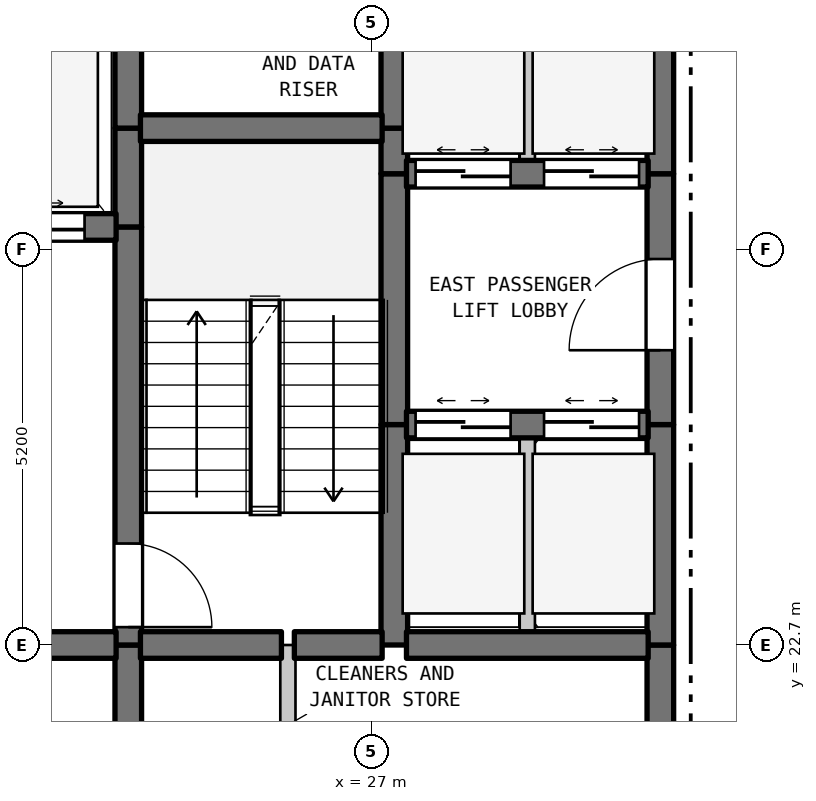
"""IFC4 building model, lengths in metres.
Left out: names, types, materials, properties, quantities, classifications, styles, units other than length and angle.
Written with IfcOpenShell. Run it as: python <this file> out.ifc"""

import sys

from ifc_helpers import new_model, si_unit, direction, frame, frame_2d, origin, place, context, subcontext, project, spatial, rectangle, extrude, element, fill, save


model = new_model("IFC4")
c1 = context("Model", 3, precision=1e-05, world=origin(), true_north=direction((0.0, 1.0)))
c2 = subcontext(c1, "Body", "Model", "MODEL_VIEW")
j1 = project(units=[si_unit("LENGTHUNIT", "METRE"), si_unit("PLANEANGLEUNIT", "RADIAN")], contexts=[c1])
p1 = place(None, origin())
s1 = spatial("IfcSite", under=j1, at=p1, CompositionType="ELEMENT")
p2 = place(p1, origin())
s2 = spatial("IfcBuilding", under=s1, at=p2, CompositionType="ELEMENT")
p3 = place(p2, frame((0.0, 0.0, 152.0)))
s3 = spatial("IfcBuildingStorey", under=s2, at=p3, CompositionType="ELEMENT", Elevation=152.0)
p4 = place(p3, frame((23.8, 19.5, 0.0), z_axis=(0.0, 0.0, 1.0), x_axis=(0.0, 1.0, 0.0)))
e1 = element("IfcWall", 1, at=p4, inside=s3, PredefinedType="SHEAR", context=c2, shape_type="SweptSolid", body=[
    extrude(rectangle(XDim=3.2, YDim=0.35, at=frame_2d((1.6, 0.0))), origin(), (0.0, 0.0, 1.0), 3.385),
])
p5 = place(p3, frame((23.8, 22.7, 0.0), z_axis=(0.0, 0.0, 1.0), x_axis=(0.0, 1.0, 0.0)))
e2 = element("IfcWall", 2, at=p5, inside=s3, PredefinedType="SHEAR", context=c2, shape_type="SweptSolid", body=[
    extrude(rectangle(XDim=5.5, YDim=0.35, at=frame_2d((2.75, 0.0))), origin(), (0.0, 0.0, 1.0), 3.385),
])
p6 = place(p5, frame((0.235, 0.0, 0.0)))
e3 = element("IfcOpeningElement", 3, at=p6, cuts=e2, PredefinedType="OPENING", context=c2, shape_type="SweptSolid", body=[
    extrude(rectangle(XDim=1.1, YDim=2.15, at=frame_2d((0.55, 1.075))), frame((0.0, 0.185, 0.0), z_axis=(0.0, -1.0, 0.0), x_axis=(1.0, 0.0, 0.0)), (0.0, 0.0, 1.0), 0.37),
])
for number, where, z_axis, x_axis in (
    (4, (23.8, 28.2, 0.0), (0.0, 0.0, 1.0), (0.0, 1.0, 0.0)),
    (5, (23.8, 29.5, 0.0), (0.0, 0.0, 1.0), (0.0, 1.0, 0.0)),
):
    element("IfcWall", number, at=place(p3, frame(where, z_axis=z_axis, x_axis=x_axis)), inside=s3, PredefinedType="SHEAR", context=c2, shape_type="SweptSolid", body=[
        extrude(rectangle(XDim=1.3, YDim=0.35, at=frame_2d((0.65, 0.0))), origin(), (0.0, 0.0, 1.0), 3.385),
    ])
p7 = place(p3, frame((25.9, 19.5, 0.0), z_axis=(0.0, 0.0, 1.0), x_axis=(0.0, 1.0, 0.0)))
e6 = element("IfcWall", 6, at=p7, inside=s3, PredefinedType="STANDARD", context=c2, shape_type="SweptSolid", body=[
    extrude(rectangle(XDim=3.2, YDim=0.2, at=frame_2d((1.6, 0.0))), origin(), (0.0, 0.0, 1.0), 3.385),
])
p8 = place(p3, frame((27.3, 22.7, 0.0), z_axis=(0.0, 0.0, 1.0), x_axis=(0.0, 1.0, 0.0)))
e7 = element("IfcWall", 7, at=p8, inside=s3, PredefinedType="SHEAR", context=c2, shape_type="SweptSolid", body=[
    extrude(rectangle(XDim=2.9, YDim=0.35, at=frame_2d((1.45, 0.0))), origin(), (0.0, 0.0, 1.0), 3.385),
])
p9 = place(p3, frame((27.3, 25.6, 0.0), z_axis=(0.0, 0.0, 1.0), x_axis=(0.0, 1.0, 0.0)))
e8 = element("IfcWall", 8, at=p9, inside=s3, PredefinedType="SHEAR", context=c2, shape_type="SweptSolid", body=[
    extrude(rectangle(XDim=3.3, YDim=0.35, at=frame_2d((1.65, 0.0))), origin(), (0.0, 0.0, 1.0), 3.385),
])
p10 = place(p3, frame((27.3, 28.9, 0.0), z_axis=(0.0, 0.0, 1.0), x_axis=(0.0, 1.0, 0.0)))
e9 = element("IfcWall", 9, at=p10, inside=s3, PredefinedType="SHEAR", context=c2, shape_type="SweptSolid", body=[
    extrude(rectangle(XDim=0.6, YDim=0.35, at=frame_2d((0.3, 0.0))), origin(), (0.0, 0.0, 1.0), 3.385),
])
p11 = place(p3, frame((27.3, 29.5, 0.0), z_axis=(0.0, 0.0, 1.0), x_axis=(0.0, 1.0, 0.0)))
e10 = element("IfcWall", 10, at=p11, inside=s3, PredefinedType="SHEAR", context=c2, shape_type="SweptSolid", body=[
    extrude(rectangle(XDim=2.0, YDim=0.35, at=frame_2d((1.0, 0.0))), origin(), (0.0, 0.0, 1.0), 3.385),
])
p12 = place(p3, frame((29.05, 22.7, 0.0), z_axis=(0.0, 0.0, 1.0), x_axis=(0.0, 1.0, 0.0)))
e11 = element("IfcWall", 11, at=p12, inside=s3, PredefinedType="STANDARD", context=c2, shape_type="SweptSolid", body=[
    extrude(rectangle(XDim=2.9, YDim=0.2, at=frame_2d((1.45, 0.0))), origin(), (0.0, 0.0, 1.0), 3.385),
])
p13 = place(p3, frame((29.05, 28.9, 0.0), z_axis=(0.0, 0.0, 1.0), x_axis=(0.0, 1.0, 0.0)))
e12 = element("IfcWall", 12, at=p13, inside=s3, PredefinedType="STANDARD", context=c2, shape_type="SweptSolid", body=[
    extrude(rectangle(XDim=2.6, YDim=0.2, at=frame_2d((1.3, 0.0))), origin(), (0.0, 0.0, 1.0), 3.385),
])
p14 = place(p3, frame((30.8, 19.5, 0.0), z_axis=(0.0, 0.0, 1.0), x_axis=(0.0, 1.0, 0.0)))
e13 = element("IfcWall", 13, at=p14, inside=s3, PredefinedType="SHEAR", context=c2, shape_type="SweptSolid", body=[
    extrude(rectangle(XDim=3.2, YDim=0.35, at=frame_2d((1.6, 0.0))), origin(), (0.0, 0.0, 1.0), 3.385),
])
p15 = place(p3, frame((30.8, 22.7, 0.0), z_axis=(0.0, 0.0, 1.0), x_axis=(0.0, 1.0, 0.0)))
e14 = element("IfcWall", 14, at=p15, inside=s3, PredefinedType="SHEAR", context=c2, shape_type="SweptSolid", body=[
    extrude(rectangle(XDim=2.9, YDim=0.35, at=frame_2d((1.45, 0.0))), origin(), (0.0, 0.0, 1.0), 3.385),
])
p16 = place(p3, frame((30.8, 25.6, 0.0), z_axis=(0.0, 0.0, 1.0), x_axis=(0.0, 1.0, 0.0)))
e15 = element("IfcWall", 15, at=p16, inside=s3, PredefinedType="SHEAR", context=c2, shape_type="SweptSolid", body=[
    extrude(rectangle(XDim=3.3, YDim=0.35, at=frame_2d((1.65, 0.0))), origin(), (0.0, 0.0, 1.0), 3.385),
])
p17 = place(p16, frame((0.978, 0.0, 0.0)))
e16 = element("IfcOpeningElement", 16, at=p17, cuts=e15, PredefinedType="OPENING", context=c2, shape_type="SweptSolid", body=[
    extrude(rectangle(XDim=1.2, YDim=2.2, at=frame_2d((0.6, 1.1))), frame((0.0, 0.185, 0.0), z_axis=(0.0, -1.0, 0.0), x_axis=(1.0, 0.0, 0.0)), (0.0, 0.0, 1.0), 0.37),
])
p18 = place(p3, frame((30.8, 28.9, 0.0), z_axis=(0.0, 0.0, 1.0), x_axis=(0.0, 1.0, 0.0)))
e17 = element("IfcWall", 17, at=p18, inside=s3, PredefinedType="SHEAR", context=c2, shape_type="SweptSolid", body=[
    extrude(rectangle(XDim=2.6, YDim=0.35, at=frame_2d((1.3, 0.0))), origin(), (0.0, 0.0, 1.0), 3.385),
])
p19 = place(p3, frame((19.16, 22.7, 0.0), z_axis=(0.0, 0.0, 1.0), x_axis=(1.0, 0.0, 0.0)))
e18 = element("IfcWall", 18, at=p19, inside=s3, PredefinedType="SHEAR", context=c2, shape_type="SweptSolid", body=[
    extrude(rectangle(XDim=4.48, YDim=0.35, at=frame_2d((2.24, 0.0))), origin(), (0.0, 0.0, 1.0), 3.385),
])
p20 = place(p19, frame((1.64, 0.0, 0.0)))
e19 = element("IfcOpeningElement", 19, at=p20, cuts=e18, PredefinedType="OPENING", context=c2, shape_type="SweptSolid", body=[
    extrude(rectangle(XDim=1.2, YDim=2.2, at=frame_2d((0.6, 1.1))), frame((0.0, 0.185, 0.0), z_axis=(0.0, -1.0, 0.0), x_axis=(1.0, 0.0, 0.0)), (0.0, 0.0, 1.0), 0.37),
])
p21 = place(p3, frame((23.96, 22.7, 0.0), z_axis=(0.0, 0.0, 1.0), x_axis=(1.0, 0.0, 0.0)))
e20 = element("IfcWall", 20, at=p21, inside=s3, PredefinedType="SHEAR", context=c2, shape_type="SweptSolid", body=[
    extrude(rectangle(XDim=1.855, YDim=0.35, at=frame_2d((0.927, 0.0))), origin(), (0.0, 0.0, 1.0), 3.385),
])
p22 = place(p3, frame((25.985, 22.7, 0.0), z_axis=(0.0, 0.0, 1.0), x_axis=(1.0, 0.0, 0.0)))
e21 = element("IfcWall", 21, at=p22, inside=s3, PredefinedType="SHEAR", context=c2, shape_type="SweptSolid", body=[
    extrude(rectangle(XDim=1.155, YDim=0.35, at=frame_2d((0.577, 0.0))), origin(), (0.0, 0.0, 1.0), 3.385),
])
p23 = place(p3, frame((27.46, 22.7, 0.0), z_axis=(0.0, 0.0, 1.0), x_axis=(1.0, 0.0, 0.0)))
e22 = element("IfcWall", 22, at=p23, inside=s3, PredefinedType="SHEAR", context=c2, shape_type="SweptSolid", body=[
    extrude(rectangle(XDim=3.18, YDim=0.35, at=frame_2d((1.59, 0.0))), origin(), (0.0, 0.0, 1.0), 3.385),
])
p24 = place(p3, frame((27.46, 25.6, 0.0), z_axis=(0.0, 0.0, 1.0), x_axis=(1.0, 0.0, 0.0)))
e23 = element("IfcWall", 23, at=p24, inside=s3, PredefinedType="SHEAR", context=c2, shape_type="SweptSolid", body=[
    extrude(rectangle(XDim=3.18, YDim=0.35, at=frame_2d((1.59, 0.0))), origin(), (0.0, 0.0, 1.0), 3.385),
])
p25 = place(p24, frame((0.12, 0.0, 0.0)))
e24 = element("IfcOpeningElement", 24, at=p25, cuts=e23, PredefinedType="OPENING", context=c2, shape_type="SweptSolid", body=[
    extrude(rectangle(XDim=1.25, YDim=2.2, at=frame_2d((0.625, 1.1))), frame((0.0, 0.185, 0.0), z_axis=(0.0, -1.0, 0.0), x_axis=(1.0, 0.0, 0.0)), (0.0, 0.0, 1.0), 0.37),
])
p26 = place(p24, frame((1.81, 0.0, 0.0)))
e25 = element("IfcOpeningElement", 25, at=p26, cuts=e23, PredefinedType="OPENING", context=c2, shape_type="SweptSolid", body=[
    extrude(rectangle(XDim=1.25, YDim=2.2, at=frame_2d((0.625, 1.1))), frame((0.0, 0.185, 0.0), z_axis=(0.0, -1.0, 0.0), x_axis=(1.0, 0.0, 0.0)), (0.0, 0.0, 1.0), 0.37),
])
p27 = place(p3, frame((19.16, 28.2, 0.0), z_axis=(0.0, 0.0, 1.0), x_axis=(1.0, 0.0, 0.0)))
e26 = element("IfcWall", 26, at=p27, inside=s3, PredefinedType="SHEAR", context=c2, shape_type="SweptSolid", body=[
    extrude(rectangle(XDim=4.48, YDim=0.35, at=frame_2d((2.24, 0.0))), origin(), (0.0, 0.0, 1.0), 3.385),
])
p28 = place(p27, frame((0.415, 0.0, 0.0)))
e27 = element("IfcOpeningElement", 27, at=p28, cuts=e26, PredefinedType="OPENING", context=c2, shape_type="SweptSolid", body=[
    extrude(rectangle(XDim=1.25, YDim=2.2, at=frame_2d((0.625, 1.1))), frame((0.0, 0.185, 0.0), z_axis=(0.0, -1.0, 0.0), x_axis=(1.0, 0.0, 0.0)), (0.0, 0.0, 1.0), 0.37),
])
p29 = place(p27, frame((2.815, 0.0, 0.0)))
e28 = element("IfcOpeningElement", 28, at=p29, cuts=e26, PredefinedType="OPENING", context=c2, shape_type="SweptSolid", body=[
    extrude(rectangle(XDim=1.25, YDim=2.2, at=frame_2d((0.625, 1.1))), frame((0.0, 0.185, 0.0), z_axis=(0.0, -1.0, 0.0), x_axis=(1.0, 0.0, 0.0)), (0.0, 0.0, 1.0), 0.37),
])
p30 = place(p3, frame((27.46, 28.9, 0.0), z_axis=(0.0, 0.0, 1.0), x_axis=(1.0, 0.0, 0.0)))
e29 = element("IfcWall", 29, at=p30, inside=s3, PredefinedType="SHEAR", context=c2, shape_type="SweptSolid", body=[
    extrude(rectangle(XDim=3.18, YDim=0.35, at=frame_2d((1.59, 0.0))), origin(), (0.0, 0.0, 1.0), 3.385),
])
p31 = place(p30, frame((0.12, 0.0, 0.0)))
e30 = element("IfcOpeningElement", 30, at=p31, cuts=e29, PredefinedType="OPENING", context=c2, shape_type="SweptSolid", body=[
    extrude(rectangle(XDim=1.25, YDim=2.2, at=frame_2d((0.625, 1.1))), frame((0.0, 0.185, 0.0), z_axis=(0.0, -1.0, 0.0), x_axis=(1.0, 0.0, 0.0)), (0.0, 0.0, 1.0), 0.37),
])
p32 = place(p30, frame((1.81, 0.0, 0.0)))
e31 = element("IfcOpeningElement", 31, at=p32, cuts=e29, PredefinedType="OPENING", context=c2, shape_type="SweptSolid", body=[
    extrude(rectangle(XDim=1.25, YDim=2.2, at=frame_2d((0.625, 1.1))), frame((0.0, 0.185, 0.0), z_axis=(0.0, -1.0, 0.0), x_axis=(1.0, 0.0, 0.0)), (0.0, 0.0, 1.0), 0.37),
])
p33 = place(p3, frame((23.96, 29.5, 0.0), z_axis=(0.0, 0.0, 1.0), x_axis=(1.0, 0.0, 0.0)))
e32 = element("IfcWall", 32, at=p33, inside=s3, PredefinedType="SHEAR", context=c2, shape_type="SweptSolid", body=[
    extrude(rectangle(XDim=3.18, YDim=0.35, at=frame_2d((1.59, 0.0))), origin(), (0.0, 0.0, 1.0), 3.385),
])
p34 = place(p6, frame((1.1, 0.0, 0.0), z_axis=(0.0, 0.0, 1.0), x_axis=(-1.0, 0.0, 0.0)))
e33 = element("IfcDoor", 33, at=p34, inside=s3, OperationType="SINGLE_SWING_LEFT", PredefinedType="DOOR", context=c2, shape_type="SweptSolid", body=[
    extrude(rectangle(XDim=1.1, YDim=2.15, at=frame_2d((0.55, 1.075))), frame((0.0, 0.025, 0.0), z_axis=(0.0, -1.0, 0.0), x_axis=(1.0, 0.0, 0.0)), (0.0, 0.0, 1.0), 0.05),
])
fill(e3, e33)
p35 = place(p17, origin())
e34 = element("IfcDoor", 34, at=p35, inside=s3, OperationType="SINGLE_SWING_LEFT", PredefinedType="DOOR", context=c2, shape_type="SweptSolid", body=[
    extrude(rectangle(XDim=1.2, YDim=2.2, at=frame_2d((0.6, 1.1))), frame((0.0, 0.025, 0.0), z_axis=(0.0, -1.0, 0.0), x_axis=(1.0, 0.0, 0.0)), (0.0, 0.0, 1.0), 0.05),
])
fill(e16, e34)
p36 = place(p25, origin())
e35 = element("IfcDoor", 35, at=p36, inside=s3, OperationType="DOUBLE_DOOR_SLIDING", PredefinedType="DOOR", context=c2, shape_type="SweptSolid", body=[
    extrude(rectangle(XDim=1.25, YDim=2.2, at=frame_2d((0.625, 1.1))), frame((0.0, 0.025, 0.0), z_axis=(0.0, -1.0, 0.0), x_axis=(1.0, 0.0, 0.0)), (0.0, 0.0, 1.0), 0.05),
])
fill(e24, e35)
p37 = place(p26, origin())
e36 = element("IfcDoor", 36, at=p37, inside=s3, OperationType="DOUBLE_DOOR_SLIDING", PredefinedType="DOOR", context=c2, shape_type="SweptSolid", body=[
    extrude(rectangle(XDim=1.25, YDim=2.2, at=frame_2d((0.625, 1.1))), frame((0.0, 0.025, 0.0), z_axis=(0.0, -1.0, 0.0), x_axis=(1.0, 0.0, 0.0)), (0.0, 0.0, 1.0), 0.05),
])
fill(e25, e36)
p38 = place(p29, origin())
e37 = element("IfcDoor", 37, at=p38, inside=s3, OperationType="DOUBLE_DOOR_SLIDING", PredefinedType="DOOR", context=c2, shape_type="SweptSolid", body=[
    extrude(rectangle(XDim=1.25, YDim=2.2, at=frame_2d((0.625, 1.1))), frame((0.0, 0.025, 0.0), z_axis=(0.0, -1.0, 0.0), x_axis=(1.0, 0.0, 0.0)), (0.0, 0.0, 1.0), 0.05),
])
fill(e28, e37)
p39 = place(p31, origin())
e38 = element("IfcDoor", 38, at=p39, inside=s3, OperationType="DOUBLE_DOOR_SLIDING", PredefinedType="DOOR", context=c2, shape_type="SweptSolid", body=[
    extrude(rectangle(XDim=1.25, YDim=2.2, at=frame_2d((0.625, 1.1))), frame((0.0, 0.025, 0.0), z_axis=(0.0, -1.0, 0.0), x_axis=(1.0, 0.0, 0.0)), (0.0, 0.0, 1.0), 0.05),
])
fill(e30, e38)
p40 = place(p32, origin())
e39 = element("IfcDoor", 39, at=p40, inside=s3, OperationType="DOUBLE_DOOR_SLIDING", PredefinedType="DOOR", context=c2, shape_type="SweptSolid", body=[
    extrude(rectangle(XDim=1.25, YDim=2.2, at=frame_2d((0.625, 1.1))), frame((0.0, 0.025, 0.0), z_axis=(0.0, -1.0, 0.0), x_axis=(1.0, 0.0, 0.0)), (0.0, 0.0, 1.0), 0.05),
])
fill(e31, e39)
save(model, sys.argv[1])
